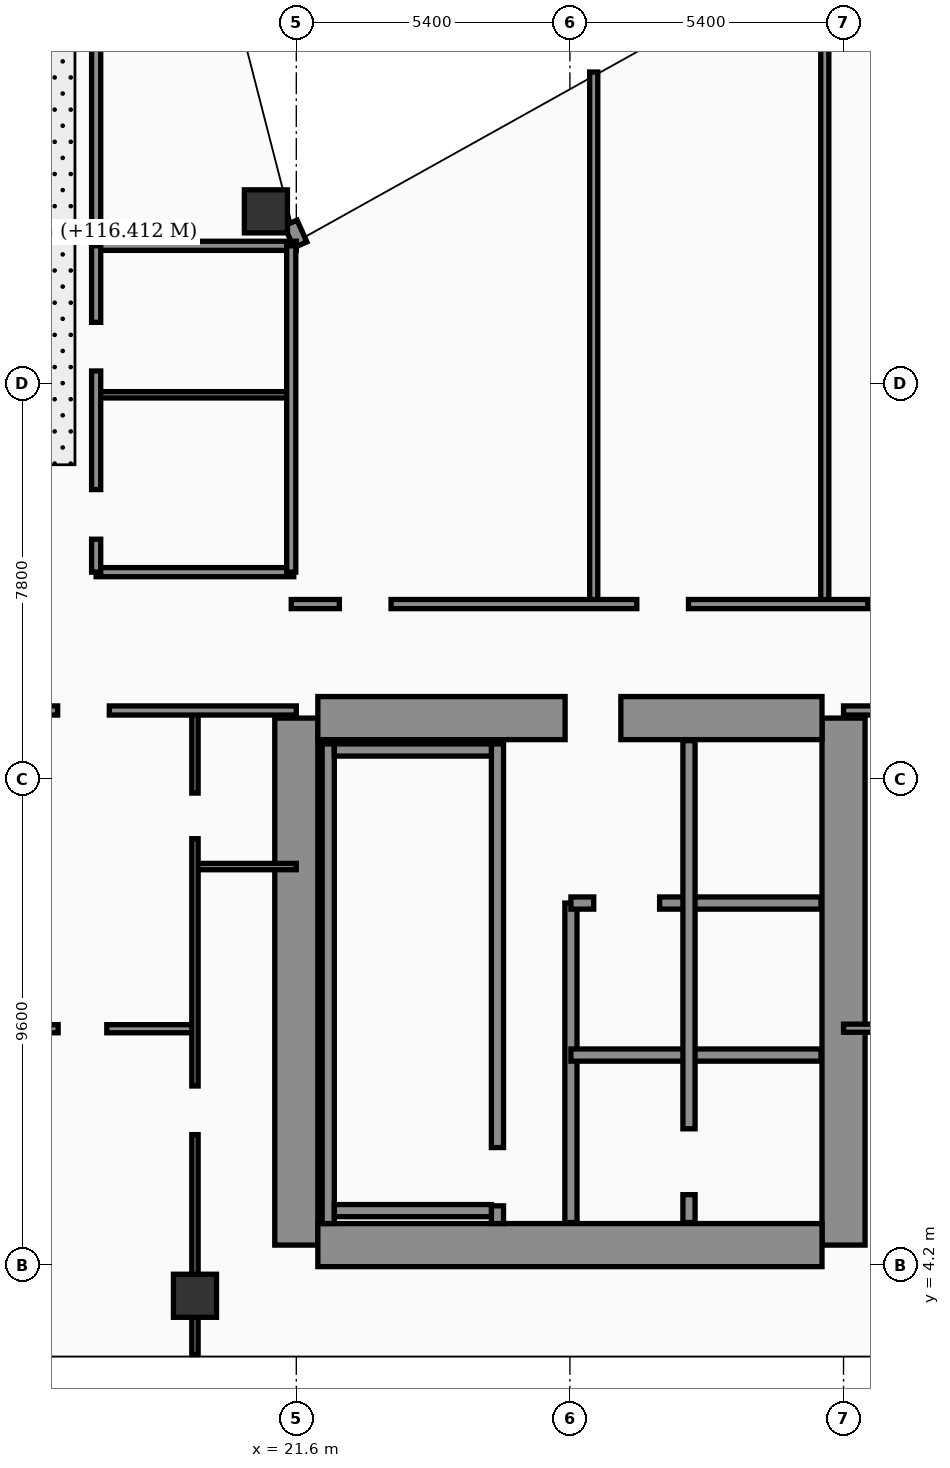
"""IFC4 building model, lengths in metres.
Left out: names, types, materials, properties, quantities, classifications, styles, units other than length and angle.
Written with IfcOpenShell. Run it as: python <this file> out.ifc"""

import sys

from ifc_helpers import new_model, si_unit, direction, frame, frame_2d, origin, origin_2d, place, context, subcontext, project, spatial, rectangle, hollow_rectangle, extrude, element, fill, save


model = new_model("IFC4")
c1 = context("Model", 3, precision=1e-05, world=origin(), true_north=direction((0.0, 1.0)))
c2 = subcontext(c1, "Body", "Model", "MODEL_VIEW")
j1 = project(units=[si_unit("LENGTHUNIT", "METRE"), si_unit("PLANEANGLEUNIT", "RADIAN")], contexts=[c1])
p1 = place(None, origin())
s1 = spatial("IfcSite", under=j1, at=p1, CompositionType="ELEMENT")
p2 = place(p1, origin())
s2 = spatial("IfcBuilding", under=s1, at=p2, CompositionType="ELEMENT")
p3 = place(p2, frame((0.0, 0.0, 116.4)))
s3 = spatial("IfcBuildingStorey", under=s2, at=p3, CompositionType="ELEMENT", Elevation=116.4)
for number, where, z_axis, x_axis in (
    (1, (21.6, 4.6, 0.0), (0.0, 0.0, 1.0), (0.0, 1.0, 0.0)),
    (2, (32.4, 4.6, 0.0), (0.0, 0.0, 1.0), (0.0, 1.0, 0.0)),
):
    element("IfcWall", number, at=place(p3, frame(where, z_axis=z_axis, x_axis=x_axis)), inside=s3, PredefinedType="SHEAR", context=c2, shape_type="SweptSolid", body=[
        extrude(rectangle(XDim=10.4, YDim=0.85, at=frame_2d((5.2, 0.0))), origin(), (0.0, 0.0, 1.0), 3.56),
    ])
p4 = place(p3, frame((22.025, 15.0, 0.0), z_axis=(0.0, 0.0, 1.0), x_axis=(1.0, 0.0, 0.0)))
e3 = element("IfcWall", 3, at=p4, inside=s3, PredefinedType="SHEAR", context=c2, shape_type="SweptSolid", body=[
    extrude(rectangle(XDim=9.95, YDim=0.85, at=frame_2d((4.975, 0.0))), origin(), (0.0, 0.0, 1.0), 3.56),
])
p5 = place(p4, frame((4.88, 0.0, 0.0)))
e4 = element("IfcOpeningElement", 4, at=p5, cuts=e3, PredefinedType="OPENING", context=c2, shape_type="SweptSolid", body=[
    extrude(rectangle(XDim=1.1, YDim=2.2, at=frame_2d((0.55, 1.1))), frame((0.0, 0.435, 0.0), z_axis=(0.0, -1.0, 0.0), x_axis=(1.0, 0.0, 0.0)), (0.0, 0.0, 1.0), 0.87),
])
p6 = place(p3, frame((22.025, 4.6, 0.0), z_axis=(0.0, 0.0, 1.0), x_axis=(1.0, 0.0, 0.0)))
e5 = element("IfcWall", 5, at=p6, inside=s3, PredefinedType="SHEAR", context=c2, shape_type="SweptSolid", body=[
    extrude(rectangle(XDim=9.95, YDim=0.85, at=frame_2d((4.975, 0.0))), origin(), (0.0, 0.0, 1.0), 3.56),
])
p7 = place(p3, frame((22.23, 5.025, 0.0), z_axis=(0.0, 0.0, 1.0), x_axis=(0.0, 1.0, 0.0)))
e6 = element("IfcWall", 6, at=p7, inside=s3, PredefinedType="SOLIDWALL", context=c2, shape_type="SweptSolid", body=[
    extrude(rectangle(XDim=9.465, YDim=0.24, at=frame_2d((4.732, 0.0))), origin(), (0.0, 0.0, 1.0), 3.56),
])
p8 = place(p3, frame((25.57, 5.025, 0.0), z_axis=(0.0, 0.0, 1.0), x_axis=(0.0, 1.0, 0.0)))
e7 = element("IfcWall", 7, at=p8, inside=s3, PredefinedType="SOLIDWALL", context=c2, shape_type="SweptSolid", body=[
    extrude(rectangle(XDim=9.465, YDim=0.24, at=frame_2d((4.732, 0.0))), origin(), (0.0, 0.0, 1.0), 3.56),
])
p9 = place(p8, frame((0.35, 0.0, 0.0)))
e8 = element("IfcOpeningElement", 8, at=p9, cuts=e7, PredefinedType="OPENING", context=c2, shape_type="SweptSolid", body=[
    extrude(rectangle(XDim=1.15, YDim=2.2, at=frame_2d((0.575, 1.1))), frame((0.0, 0.13, 0.0), z_axis=(0.0, -1.0, 0.0), x_axis=(1.0, 0.0, 0.0)), (0.0, 0.0, 1.0), 0.26),
])
for number, where, z_axis, x_axis in (
    (9, (22.35, 5.28, 0.0), (0.0, 0.0, 1.0), (1.0, 0.0, 0.0)),
    (10, (22.35, 14.37, 0.0), (0.0, 0.0, 1.0), (1.0, 0.0, 0.0)),
):
    element("IfcWall", number, at=place(p3, frame(where, z_axis=z_axis, x_axis=x_axis)), inside=s3, PredefinedType="SOLIDWALL", context=c2, shape_type="SweptSolid", body=[
        extrude(rectangle(XDim=3.1, YDim=0.24, at=frame_2d((1.55, 0.0))), origin(), (0.0, 0.0, 1.0), 3.56),
    ])
for number, where, z_axis, x_axis in (
    (11, (21.0, 25.0, 0.0), (0.0, 0.0, 1.0), (1.0, 0.0, 0.0)),
    (12, (19.6, 3.6, 0.0), (0.0, 0.0, 1.0), (1.0, 0.0, 0.0)),
):
    element("IfcColumn", number, at=place(p3, frame(where, z_axis=z_axis, x_axis=x_axis)), inside=s3, PredefinedType="COLUMN", context=c2, shape_type="SweptSolid", body=[
        extrude(hollow_rectangle(XDim=0.85, YDim=0.85, WallThickness=0.036, at=origin_2d()), origin(), (0.0, 0.0, 1.0), 3.56),
    ])
p10 = place(p3, frame((21.68, 24.34, 0.0), z_axis=(0.0, 0.0, 1.0), x_axis=(-0.40758134973, 0.913168901875, 0.0)))
e13 = element("IfcWall", 13, at=p10, inside=s3, PredefinedType="SOLIDWALL", context=c2, shape_type="SweptSolid", body=[
    extrude(rectangle(XDim=0.471, YDim=0.28, at=frame_2d((0.235, 0.0))), origin(), (0.0, 0.0, 1.0), 3.56),
])
p11 = place(p3, frame((27.02, 5.045, 0.0), z_axis=(0.0, 0.0, 1.0), x_axis=(0.0, 1.0, 0.0)))
e14 = element("IfcWall", 14, at=p11, inside=s3, PredefinedType="SOLIDWALL", context=c2, shape_type="SweptSolid", body=[
    extrude(rectangle(XDim=6.305, YDim=0.24, at=frame_2d((3.153, 0.0))), origin(), (0.0, 0.0, 1.0), 3.56),
])
p12 = place(p3, frame((27.02, 11.35, 0.0), z_axis=(0.0, 0.0, 1.0), x_axis=(1.0, 0.0, 0.0)))
e15 = element("IfcWall", 15, at=p12, inside=s3, PredefinedType="SOLIDWALL", context=c2, shape_type="SweptSolid", body=[
    extrude(rectangle(XDim=4.935, YDim=0.24, at=frame_2d((2.468, 0.0))), origin(), (0.0, 0.0, 1.0), 3.56),
])
p13 = place(p12, frame((0.45, 0.0, 0.0)))
e16 = element("IfcOpeningElement", 16, at=p13, cuts=e15, PredefinedType="OPENING", context=c2, shape_type="SweptSolid", body=[
    extrude(rectangle(XDim=1.3, YDim=2.35, at=frame_2d((0.65, 1.175))), frame((0.0, 0.13, 0.0), z_axis=(0.0, -1.0, 0.0), x_axis=(1.0, 0.0, 0.0)), (0.0, 0.0, 1.0), 0.26),
])
p14 = place(p3, frame((27.02, 8.35, 0.0), z_axis=(0.0, 0.0, 1.0), x_axis=(1.0, 0.0, 0.0)))
e17 = element("IfcWall", 17, at=p14, inside=s3, PredefinedType="SOLIDWALL", context=c2, shape_type="SweptSolid", body=[
    extrude(rectangle(XDim=4.935, YDim=0.24, at=frame_2d((2.468, 0.0))), origin(), (0.0, 0.0, 1.0), 3.09),
])
p15 = place(p3, frame((29.35, 5.045, 0.0), z_axis=(0.0, 0.0, 1.0), x_axis=(0.0, 1.0, 0.0)))
e18 = element("IfcWall", 18, at=p15, inside=s3, PredefinedType="SOLIDWALL", context=c2, shape_type="SweptSolid", body=[
    extrude(rectangle(XDim=9.51, YDim=0.24, at=frame_2d((4.755, 0.0))), origin(), (0.0, 0.0, 1.0), 3.56),
])
p16 = place(p15, frame((0.55, 0.0, 0.0)))
e19 = element("IfcOpeningElement", 19, at=p16, cuts=e18, PredefinedType="OPENING", context=c2, shape_type="SweptSolid", body=[
    extrude(rectangle(XDim=1.3, YDim=2.35, at=frame_2d((0.65, 1.175))), frame((0.0, 0.13, 0.0), z_axis=(0.0, -1.0, 0.0), x_axis=(1.0, 0.0, 0.0)), (0.0, 0.0, 1.0), 0.26),
])
p17 = place(p3, frame((19.6, 12.07, 0.0), z_axis=(0.0, 0.0, 1.0), x_axis=(1.0, 0.0, 0.0)))
e20 = element("IfcWall", 20, at=p17, inside=s3, PredefinedType="PARTITIONING", context=c2, shape_type="SweptSolid", body=[
    extrude(rectangle(XDim=2.0, YDim=0.125, at=frame_2d((1.0, 0.0))), origin(), (0.0, 0.0, 1.0), 3.56),
])
p18 = place(p3, frame((15.15, 8.87, 0.0), z_axis=(0.0, 0.0, 1.0), x_axis=(1.0, 0.0, 0.0)))
e21 = element("IfcWall", 21, at=p18, inside=s3, PredefinedType="PARTITIONING", context=c2, shape_type="SweptSolid", body=[
    extrude(rectangle(XDim=4.45, YDim=0.16, at=frame_2d((2.225, 0.0))), origin(), (0.0, 0.0, 1.0), 3.56),
])
p19 = place(p18, frame((1.75, 0.0, 0.0)))
e22 = element("IfcOpeningElement", 22, at=p19, cuts=e21, PredefinedType="OPENING", context=c2, shape_type="SweptSolid", body=[
    extrude(rectangle(XDim=0.96, YDim=2.2, at=frame_2d((0.48, 1.1))), frame((0.0, 0.09, 0.0), z_axis=(0.0, -1.0, 0.0), x_axis=(1.0, 0.0, 0.0)), (0.0, 0.0, 1.0), 0.18),
])
p20 = place(p3, frame((19.6, 2.44, 0.0), z_axis=(0.0, 0.0, 1.0), x_axis=(0.0, 1.0, 0.0)))
e23 = element("IfcWall", 23, at=p20, inside=s3, PredefinedType="PARTITIONING", context=c2, shape_type="SweptSolid", body=[
    extrude(rectangle(XDim=12.71, YDim=0.125, at=frame_2d((6.355, 0.0))), origin(), (0.0, 0.0, 1.0), 2.49),
])
p21 = place(p20, frame((4.34, 0.0, 0.0)))
e24 = element("IfcOpeningElement", 24, at=p21, cuts=e23, PredefinedType="OPENING", context=c2, shape_type="SweptSolid", body=[
    extrude(rectangle(XDim=0.96, YDim=2.2, at=frame_2d((0.48, 1.1))), frame((0.0, 0.073, 0.0), z_axis=(0.0, -1.0, 0.0), x_axis=(1.0, 0.0, 0.0)), (0.0, 0.0, 1.0), 0.145),
])
p22 = place(p20, frame((10.18, 0.0, 0.0)))
e25 = element("IfcOpeningElement", 25, at=p22, cuts=e23, PredefinedType="OPENING", context=c2, shape_type="SweptSolid", body=[
    extrude(rectangle(XDim=0.9, YDim=2.15, at=frame_2d((0.45, 1.075))), frame((0.0, 0.073, 0.0), z_axis=(0.0, -1.0, 0.0), x_axis=(1.0, 0.0, 0.0)), (0.0, 0.0, 1.0), 0.145),
])
p23 = place(p3, frame((15.15, 15.15, 0.0), z_axis=(0.0, 0.0, 1.0), x_axis=(1.0, 0.0, 0.0)))
e26 = element("IfcWall", 26, at=p23, inside=s3, PredefinedType="PARTITIONING", context=c2, shape_type="SweptSolid", body=[
    extrude(rectangle(XDim=6.45, YDim=0.18, at=frame_2d((3.225, 0.0))), origin(), (0.0, 0.0, 1.0), 2.49),
])
p24 = place(p23, frame((1.74, 0.0, 0.0)))
e27 = element("IfcOpeningElement", 27, at=p24, cuts=e26, PredefinedType="OPENING", context=c2, shape_type="SweptSolid", body=[
    extrude(rectangle(XDim=1.02, YDim=2.2, at=frame_2d((0.51, 1.1))), frame((0.0, 0.1, 0.0), z_axis=(0.0, -1.0, 0.0), x_axis=(1.0, 0.0, 0.0)), (0.0, 0.0, 1.0), 0.2),
])
p25 = place(p3, frame((17.65, 24.3, 0.0), z_axis=(0.0, 0.0, 1.0), x_axis=(0.0, 1.0, 0.0)))
e28 = element("IfcWall", 28, at=p25, inside=s3, PredefinedType="PARTITIONING", context=c2, shape_type="SweptSolid", body=[
    extrude(rectangle(XDim=17.65, YDim=0.18, at=frame_2d((8.825, 0.0))), origin(), (0.0, 0.0, 1.0), 2.84),
])
p26 = place(p3, frame((17.65, 17.88, 0.0), z_axis=(0.0, 0.0, 1.0), x_axis=(1.0, 0.0, 0.0)))
e29 = element("IfcWall", 29, at=p26, inside=s3, PredefinedType="PARTITIONING", context=c2, shape_type="SweptSolid", body=[
    extrude(rectangle(XDim=3.9, YDim=0.18, at=frame_2d((1.95, 0.0))), origin(), (0.0, 0.0, 1.0), 3.56),
])
p27 = place(p3, frame((17.65, 21.38, 0.0), z_axis=(0.0, 0.0, 1.0), x_axis=(1.0, 0.0, 0.0)))
e30 = element("IfcWall", 30, at=p27, inside=s3, PredefinedType="PARTITIONING", context=c2, shape_type="SweptSolid", body=[
    extrude(rectangle(XDim=3.9, YDim=0.125, at=frame_2d((1.95, 0.0))), origin(), (0.0, 0.0, 1.0), 3.56),
])
p28 = place(p3, frame((17.65, 24.32, 0.0), z_axis=(0.0, 0.0, 1.0), x_axis=(1.0, 0.0, 0.0)))
e31 = element("IfcWall", 31, at=p28, inside=s3, PredefinedType="PARTITIONING", context=c2, shape_type="SweptSolid", body=[
    extrude(rectangle(XDim=3.95, YDim=0.18, at=frame_2d((1.975, 0.0))), origin(), (0.0, 0.0, 1.0), 3.56),
])
p29 = place(p3, frame((21.5, 17.88, 0.0), z_axis=(0.0, 0.0, 1.0), x_axis=(0.0, 1.0, 0.0)))
e32 = element("IfcWall", 32, at=p29, inside=s3, PredefinedType="PARTITIONING", context=c2, shape_type="SweptSolid", body=[
    extrude(rectangle(XDim=6.44, YDim=0.18, at=frame_2d((3.22, 0.0))), origin(), (0.0, 0.0, 1.0), 3.56),
])
p30 = place(p3, frame((17.65, 17.88, 0.0), z_axis=(0.0, 0.0, 1.0), x_axis=(0.0, 1.0, 0.0)))
e33 = element("IfcWall", 33, at=p30, inside=s3, PredefinedType="PARTITIONING", context=c2, shape_type="SweptSolid", body=[
    extrude(rectangle(XDim=6.44, YDim=0.18, at=frame_2d((3.22, 0.0))), origin(), (0.0, 0.0, 1.0), 3.56),
])
p31 = place(p30, frame((0.65, 0.0, 0.0)))
e34 = element("IfcOpeningElement", 34, at=p31, cuts=e33, PredefinedType="OPENING", context=c2, shape_type="SweptSolid", body=[
    extrude(rectangle(XDim=0.98, YDim=2.15, at=frame_2d((0.49, 1.075))), frame((0.0, 0.1, 0.0), z_axis=(0.0, -1.0, 0.0), x_axis=(1.0, 0.0, 0.0)), (0.0, 0.0, 1.0), 0.2),
])
p32 = place(p30, frame((3.97, 0.0, 0.0)))
e35 = element("IfcOpeningElement", 35, at=p32, cuts=e33, PredefinedType="OPENING", context=c2, shape_type="SweptSolid", body=[
    extrude(rectangle(XDim=0.96, YDim=2.2, at=frame_2d((0.48, 1.1))), frame((0.0, 0.1, 0.0), z_axis=(0.0, -1.0, 0.0), x_axis=(1.0, 0.0, 0.0)), (0.0, 0.0, 1.0), 0.2),
])
p33 = place(p3, frame((32.4, 8.88, 0.0), z_axis=(0.0, 0.0, 1.0), x_axis=(1.0, 0.0, 0.0)))
e36 = element("IfcWall", 36, at=p33, inside=s3, PredefinedType="PARTITIONING", context=c2, shape_type="SweptSolid", body=[
    extrude(rectangle(XDim=5.2, YDim=0.16, at=frame_2d((2.6, 0.0))), origin(), (0.0, 0.0, 1.0), 2.84),
])
p34 = place(p33, frame((2.12, 0.0, 0.0)))
e37 = element("IfcOpeningElement", 37, at=p34, cuts=e36, PredefinedType="OPENING", context=c2, shape_type="SweptSolid", body=[
    extrude(rectangle(XDim=0.96, YDim=2.2, at=frame_2d((0.48, 1.1))), frame((0.0, 0.09, 0.0), z_axis=(0.0, -1.0, 0.0), x_axis=(1.0, 0.0, 0.0)), (0.0, 0.0, 1.0), 0.18),
])
p35 = place(p3, frame((32.4, 15.15, 0.0), z_axis=(0.0, 0.0, 1.0), x_axis=(1.0, 0.0, 0.0)))
e38 = element("IfcWall", 38, at=p35, inside=s3, PredefinedType="PARTITIONING", context=c2, shape_type="SweptSolid", body=[
    extrude(rectangle(XDim=7.2, YDim=0.18, at=frame_2d((3.6, 0.0))), origin(), (0.0, 0.0, 1.0), 2.84),
])
p36 = place(p35, frame((2.19, 0.0, 0.0)))
e39 = element("IfcOpeningElement", 39, at=p36, cuts=e38, PredefinedType="OPENING", context=c2, shape_type="SweptSolid", body=[
    extrude(rectangle(XDim=1.02, YDim=2.2, at=frame_2d((0.51, 1.1))), frame((0.0, 0.1, 0.0), z_axis=(0.0, -1.0, 0.0), x_axis=(1.0, 0.0, 0.0)), (0.0, 0.0, 1.0), 0.2),
])
p37 = place(p3, frame((27.47, 17.25, 0.0), z_axis=(0.0, 0.0, 1.0), x_axis=(0.0, 1.0, 0.0)))
e40 = element("IfcWall", 40, at=p37, inside=s3, PredefinedType="PARTITIONING", context=c2, shape_type="SweptSolid", body=[
    extrude(rectangle(XDim=10.5, YDim=0.16, at=frame_2d((5.25, 0.0))), origin(), (0.0, 0.0, 1.0), 2.84),
])
p38 = place(p3, frame((32.03, 17.25, 0.0), z_axis=(0.0, 0.0, 1.0), x_axis=(0.0, 1.0, 0.0)))
e41 = element("IfcWall", 41, at=p38, inside=s3, PredefinedType="PARTITIONING", context=c2, shape_type="SweptSolid", body=[
    extrude(rectangle(XDim=13.04, YDim=0.16, at=frame_2d((6.52, 0.0))), origin(), (0.0, 0.0, 1.0), 2.84),
])
p39 = place(p3, frame((21.5, 17.25, 0.0), z_axis=(0.0, 0.0, 1.0), x_axis=(1.0, 0.0, 0.0)))
e42 = element("IfcWall", 42, at=p39, inside=s3, PredefinedType="PARTITIONING", context=c2, shape_type="SweptSolid", body=[
    extrude(rectangle(XDim=15.75, YDim=0.18, at=frame_2d((7.875, 0.0))), origin(), (0.0, 0.0, 1.0), 2.84),
])
p40 = place(p39, frame((0.95, 0.0, 0.0)))
e43 = element("IfcOpeningElement", 43, at=p40, cuts=e42, PredefinedType="OPENING", context=c2, shape_type="SweptSolid", body=[
    extrude(rectangle(XDim=1.02, YDim=2.2, at=frame_2d((0.51, 1.1))), frame((0.0, 0.1, 0.0), z_axis=(0.0, -1.0, 0.0), x_axis=(1.0, 0.0, 0.0)), (0.0, 0.0, 1.0), 0.2),
])
p41 = place(p39, frame((6.82, 0.0, 0.0)))
e44 = element("IfcOpeningElement", 44, at=p41, cuts=e42, PredefinedType="OPENING", context=c2, shape_type="SweptSolid", body=[
    extrude(rectangle(XDim=1.02, YDim=2.2, at=frame_2d((0.51, 1.1))), frame((0.0, 0.1, 0.0), z_axis=(0.0, -1.0, 0.0), x_axis=(1.0, 0.0, 0.0)), (0.0, 0.0, 1.0), 0.2),
])
p42 = place(p39, frame((11.38, 0.0, 0.0)))
e45 = element("IfcOpeningElement", 45, at=p42, cuts=e42, PredefinedType="OPENING", context=c2, shape_type="SweptSolid", body=[
    extrude(rectangle(XDim=1.02, YDim=2.2, at=frame_2d((0.51, 1.1))), frame((0.0, 0.1, 0.0), z_axis=(0.0, -1.0, 0.0), x_axis=(1.0, 0.0, 0.0)), (0.0, 0.0, 1.0), 0.2),
])
p43 = place(p13, origin())
e46 = element("IfcDoor", 46, at=p43, inside=s3, OperationType="DOUBLE_DOOR_SLIDING", PredefinedType="DOOR", context=c2, shape_type="SweptSolid", body=[
    extrude(rectangle(XDim=1.3, YDim=2.35, at=frame_2d((0.65, 1.175))), frame((0.0, 0.025, 0.0), z_axis=(0.0, -1.0, 0.0), x_axis=(1.0, 0.0, 0.0)), (0.0, 0.0, 1.0), 0.05),
])
fill(e16, e46)
p44 = place(p16, origin())
e47 = element("IfcDoor", 47, at=p44, inside=s3, OperationType="DOUBLE_DOOR_SLIDING", PredefinedType="DOOR", context=c2, shape_type="SweptSolid", body=[
    extrude(rectangle(XDim=1.3, YDim=2.35, at=frame_2d((0.65, 1.175))), frame((0.0, 0.025, 0.0), z_axis=(0.0, -1.0, 0.0), x_axis=(1.0, 0.0, 0.0)), (0.0, 0.0, 1.0), 0.05),
])
fill(e19, e47)
p45 = place(p19, origin())
e48 = element("IfcDoor", 48, at=p45, inside=s3, OperationType="SINGLE_SWING_LEFT", PredefinedType="DOOR", context=c2, shape_type="SweptSolid", body=[
    extrude(rectangle(XDim=0.96, YDim=2.2, at=frame_2d((0.48, 1.1))), frame((0.0, 0.025, 0.0), z_axis=(0.0, -1.0, 0.0), x_axis=(1.0, 0.0, 0.0)), (0.0, 0.0, 1.0), 0.05),
])
fill(e22, e48)
p46 = place(p21, origin())
e49 = element("IfcDoor", 49, at=p46, inside=s3, OperationType="SINGLE_SWING_LEFT", PredefinedType="DOOR", context=c2, shape_type="SweptSolid", body=[
    extrude(rectangle(XDim=0.96, YDim=2.2, at=frame_2d((0.48, 1.1))), frame((0.0, 0.025, 0.0), z_axis=(0.0, -1.0, 0.0), x_axis=(1.0, 0.0, 0.0)), (0.0, 0.0, 1.0), 0.05),
])
fill(e24, e49)
p47 = place(p22, origin())
e50 = element("IfcDoor", 50, at=p47, inside=s3, OperationType="SINGLE_SWING_RIGHT", PredefinedType="DOOR", context=c2, shape_type="SweptSolid", body=[
    extrude(rectangle(XDim=0.9, YDim=2.15, at=frame_2d((0.45, 1.075))), frame((0.0, 0.025, 0.0), z_axis=(0.0, -1.0, 0.0), x_axis=(1.0, 0.0, 0.0)), (0.0, 0.0, 1.0), 0.05),
])
fill(e25, e50)
p48 = place(p24, origin())
e51 = element("IfcDoor", 51, at=p48, inside=s3, OperationType="SINGLE_SWING_LEFT", PredefinedType="DOOR", context=c2, shape_type="SweptSolid", body=[
    extrude(rectangle(XDim=1.02, YDim=2.2, at=frame_2d((0.51, 1.1))), frame((0.0, 0.025, 0.0), z_axis=(0.0, -1.0, 0.0), x_axis=(1.0, 0.0, 0.0)), (0.0, 0.0, 1.0), 0.05),
])
fill(e27, e51)
p49 = place(p31, origin())
e52 = element("IfcDoor", 52, at=p49, inside=s3, OperationType="SINGLE_SWING_LEFT", PredefinedType="DOOR", context=c2, shape_type="SweptSolid", body=[
    extrude(rectangle(XDim=0.98, YDim=2.15, at=frame_2d((0.49, 1.075))), frame((0.0, 0.025, 0.0), z_axis=(0.0, -1.0, 0.0), x_axis=(1.0, 0.0, 0.0)), (0.0, 0.0, 1.0), 0.05),
])
fill(e34, e52)
p50 = place(p32, origin())
e53 = element("IfcDoor", 53, at=p50, inside=s3, OperationType="SINGLE_SWING_RIGHT", PredefinedType="DOOR", context=c2, shape_type="SweptSolid", body=[
    extrude(rectangle(XDim=0.96, YDim=2.2, at=frame_2d((0.48, 1.1))), frame((0.0, 0.025, 0.0), z_axis=(0.0, -1.0, 0.0), x_axis=(1.0, 0.0, 0.0)), (0.0, 0.0, 1.0), 0.05),
])
fill(e35, e53)
p51 = place(p40, origin())
e54 = element("IfcDoor", 54, at=p51, inside=s3, OperationType="SINGLE_SWING_RIGHT", PredefinedType="DOOR", context=c2, shape_type="SweptSolid", body=[
    extrude(rectangle(XDim=1.02, YDim=2.2, at=frame_2d((0.51, 1.1))), frame((0.0, 0.025, 0.0), z_axis=(0.0, -1.0, 0.0), x_axis=(1.0, 0.0, 0.0)), (0.0, 0.0, 1.0), 0.05),
])
fill(e43, e54)
p52 = place(p41, origin())
e55 = element("IfcDoor", 55, at=p52, inside=s3, OperationType="SINGLE_SWING_LEFT", PredefinedType="DOOR", context=c2, shape_type="SweptSolid", body=[
    extrude(rectangle(XDim=1.02, YDim=2.2, at=frame_2d((0.51, 1.1))), frame((0.0, 0.025, 0.0), z_axis=(0.0, -1.0, 0.0), x_axis=(1.0, 0.0, 0.0)), (0.0, 0.0, 1.0), 0.05),
])
fill(e44, e55)
p53 = place(p42, origin())
e56 = element("IfcDoor", 56, at=p53, inside=s3, OperationType="SINGLE_SWING_RIGHT", PredefinedType="DOOR", context=c2, shape_type="SweptSolid", body=[
    extrude(rectangle(XDim=1.02, YDim=2.2, at=frame_2d((0.51, 1.1))), frame((0.0, 0.025, 0.0), z_axis=(0.0, -1.0, 0.0), x_axis=(1.0, 0.0, 0.0)), (0.0, 0.0, 1.0), 0.05),
])
fill(e45, e56)
p54 = place(p9, origin())
e57 = element("IfcDoor", 57, at=p54, inside=s3, OperationType="SINGLE_SWING_RIGHT", PredefinedType="DOOR", context=c2, shape_type="SweptSolid", body=[
    extrude(rectangle(XDim=1.15, YDim=2.2, at=frame_2d((0.575, 1.1))), frame((0.0, 0.025, 0.0), z_axis=(0.0, -1.0, 0.0), x_axis=(1.0, 0.0, 0.0)), (0.0, 0.0, 1.0), 0.05),
])
fill(e8, e57)
p55 = place(p5, origin())
e58 = element("IfcDoor", 58, at=p55, inside=s3, OperationType="SINGLE_SWING_RIGHT", PredefinedType="DOOR", context=c2, shape_type="SweptSolid", body=[
    extrude(rectangle(XDim=1.1, YDim=2.2, at=frame_2d((0.55, 1.1))), frame((0.0, 0.025, 0.0), z_axis=(0.0, -1.0, 0.0), x_axis=(1.0, 0.0, 0.0)), (0.0, 0.0, 1.0), 0.05),
])
fill(e4, e58)
save(model, sys.argv[1])
